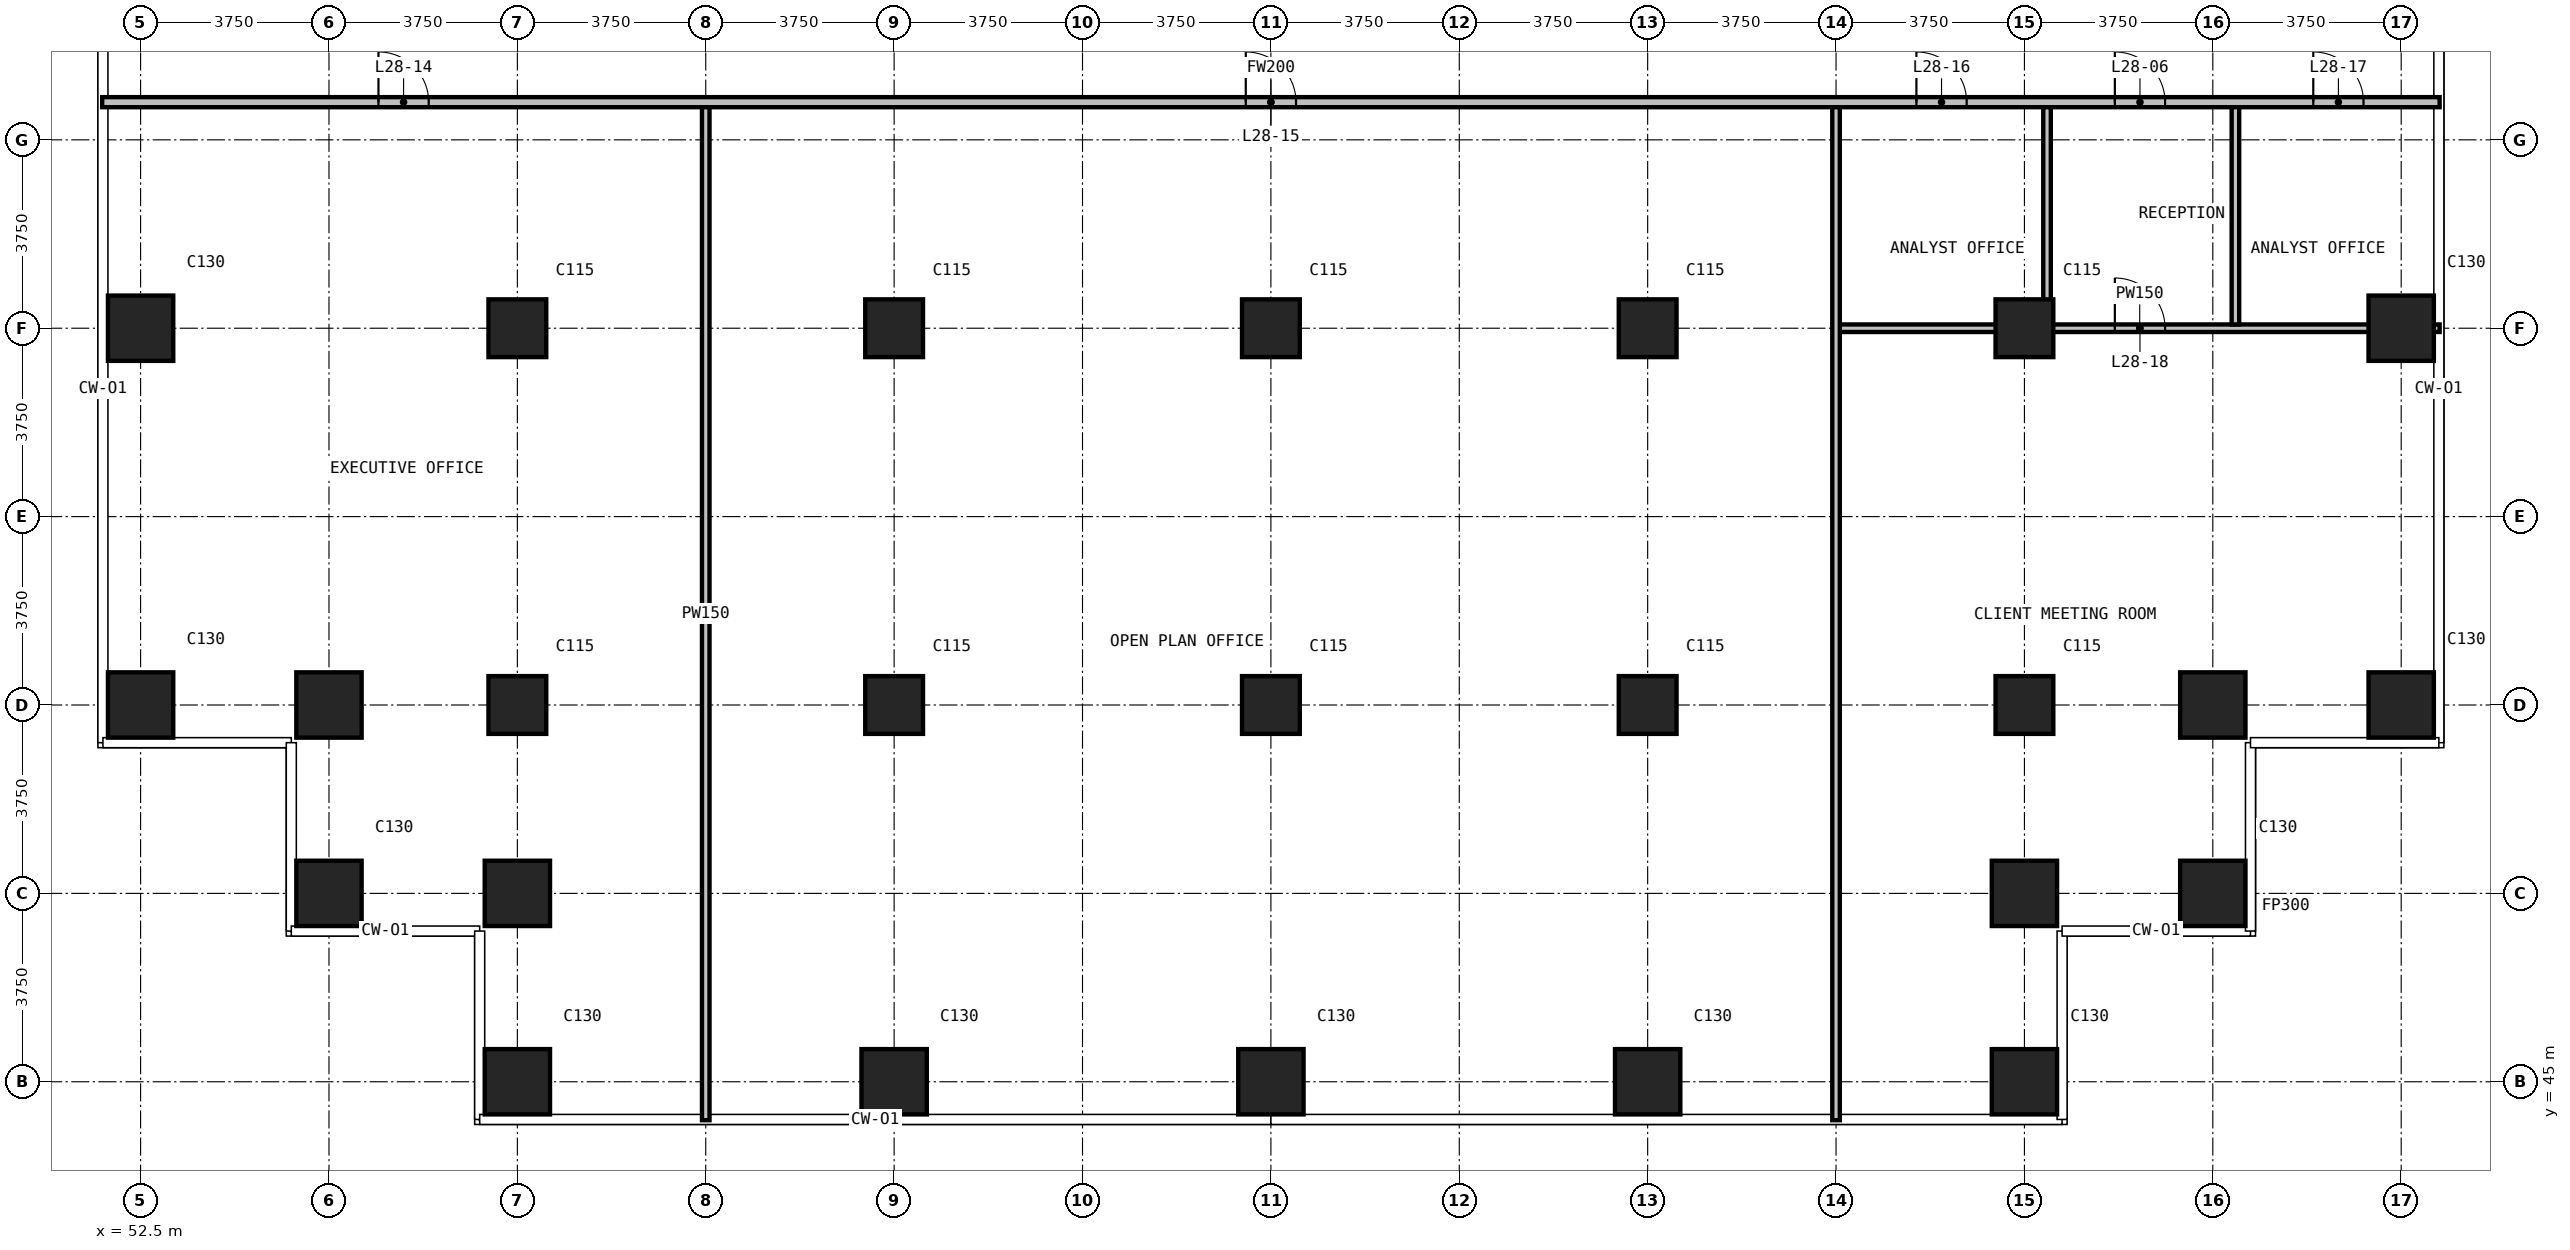
"""IFC4 building model, lengths in metres.
Left out: names, types, materials, properties, quantities, classifications, styles, units other than length and angle.
Written with IfcOpenShell. Run it as: python <this file> out.ifc"""

import sys

from ifc_helpers import new_model, si_unit, direction, frame, frame_2d, origin, origin_2d, place, context, subcontext, project, spatial, rectangle, extrude, element, fill, save


model = new_model("IFC4")
c1 = context("Model", 3, precision=1e-05, world=origin(), true_north=direction((0.0, 1.0)))
c2 = subcontext(c1, "Body", "Model", "MODEL_VIEW")
j1 = project(units=[si_unit("LENGTHUNIT", "METRE"), si_unit("PLANEANGLEUNIT", "RADIAN")], contexts=[c1])
p1 = place(None, origin())
s1 = spatial("IfcSite", under=j1, at=p1, CompositionType="ELEMENT")
p2 = place(p1, origin())
s2 = spatial("IfcBuilding", under=s1, at=p2, CompositionType="ELEMENT")
p3 = place(p2, frame((0.0, 0.0, 114.4)))
s3 = spatial("IfcBuildingStorey", under=s2, at=p3, CompositionType="ELEMENT", Elevation=114.4)
for number, where, z_axis, x_axis in (
    (1, (52.5, 52.5, 0.0), (0.0, 0.0, 1.0), (1.0, 0.0, 0.0)),
    (2, (52.5, 60.0, 0.0), (0.0, 0.0, 1.0), (1.0, 0.0, 0.0)),
    (3, (56.25, 48.75, 0.0), (0.0, 0.0, 1.0), (1.0, 0.0, 0.0)),
    (4, (56.25, 52.5, 0.0), (0.0, 0.0, 1.0), (1.0, 0.0, 0.0)),
    (5, (60.0, 45.0, 0.0), (0.0, 0.0, 1.0), (1.0, 0.0, 0.0)),
    (6, (60.0, 48.75, 0.0), (0.0, 0.0, 1.0), (1.0, 0.0, 0.0)),
):
    element("IfcColumn", number, at=place(p3, frame(where, z_axis=z_axis, x_axis=x_axis)), inside=s3, PredefinedType="COLUMN", context=c2, shape_type="SweptSolid", body=[
        extrude(rectangle(XDim=1.3, YDim=1.3, at=origin_2d()), origin(), (0.0, 0.0, 1.0), 3.6),
    ])
for number, where, z_axis, x_axis in (
    (7, (60.0, 52.5, 0.0), (0.0, 0.0, 1.0), (1.0, 0.0, 0.0)),
    (8, (60.0, 60.0, 0.0), (0.0, 0.0, 1.0), (1.0, 0.0, 0.0)),
):
    element("IfcColumn", number, at=place(p3, frame(where, z_axis=z_axis, x_axis=x_axis)), inside=s3, PredefinedType="COLUMN", context=c2, shape_type="SweptSolid", body=[
        extrude(rectangle(XDim=1.15, YDim=1.15, at=origin_2d()), origin(), (0.0, 0.0, 1.0), 3.6),
    ])
p4 = place(p3, frame((67.5, 45.0, 0.0), z_axis=(0.0, 0.0, 1.0), x_axis=(1.0, 0.0, 0.0)))
e9 = element("IfcColumn", 9, at=p4, inside=s3, PredefinedType="COLUMN", context=c2, shape_type="SweptSolid", body=[
    extrude(rectangle(XDim=1.3, YDim=1.3, at=origin_2d()), origin(), (0.0, 0.0, 1.0), 3.6),
])
for number, where, z_axis, x_axis in (
    (10, (67.5, 52.5, 0.0), (0.0, 0.0, 1.0), (1.0, 0.0, 0.0)),
    (11, (67.5, 60.0, 0.0), (0.0, 0.0, 1.0), (1.0, 0.0, 0.0)),
):
    element("IfcColumn", number, at=place(p3, frame(where, z_axis=z_axis, x_axis=x_axis)), inside=s3, PredefinedType="COLUMN", context=c2, shape_type="SweptSolid", body=[
        extrude(rectangle(XDim=1.15, YDim=1.15, at=origin_2d()), origin(), (0.0, 0.0, 1.0), 3.6),
    ])
p5 = place(p3, frame((75.0, 45.0, 0.0), z_axis=(0.0, 0.0, 1.0), x_axis=(1.0, 0.0, 0.0)))
e12 = element("IfcColumn", 12, at=p5, inside=s3, PredefinedType="COLUMN", context=c2, shape_type="SweptSolid", body=[
    extrude(rectangle(XDim=1.3, YDim=1.3, at=origin_2d()), origin(), (0.0, 0.0, 1.0), 3.6),
])
for number, where, z_axis, x_axis in (
    (13, (75.0, 52.5, 0.0), (0.0, 0.0, 1.0), (1.0, 0.0, 0.0)),
    (14, (75.0, 60.0, 0.0), (0.0, 0.0, 1.0), (1.0, 0.0, 0.0)),
):
    element("IfcColumn", number, at=place(p3, frame(where, z_axis=z_axis, x_axis=x_axis)), inside=s3, PredefinedType="COLUMN", context=c2, shape_type="SweptSolid", body=[
        extrude(rectangle(XDim=1.15, YDim=1.15, at=origin_2d()), origin(), (0.0, 0.0, 1.0), 3.6),
    ])
p6 = place(p3, frame((82.5, 45.0, 0.0), z_axis=(0.0, 0.0, 1.0), x_axis=(1.0, 0.0, 0.0)))
e15 = element("IfcColumn", 15, at=p6, inside=s3, PredefinedType="COLUMN", context=c2, shape_type="SweptSolid", body=[
    extrude(rectangle(XDim=1.3, YDim=1.3, at=origin_2d()), origin(), (0.0, 0.0, 1.0), 3.6),
])
for number, where, z_axis, x_axis in (
    (16, (82.5, 52.5, 0.0), (0.0, 0.0, 1.0), (1.0, 0.0, 0.0)),
    (17, (82.5, 60.0, 0.0), (0.0, 0.0, 1.0), (1.0, 0.0, 0.0)),
):
    element("IfcColumn", number, at=place(p3, frame(where, z_axis=z_axis, x_axis=x_axis)), inside=s3, PredefinedType="COLUMN", context=c2, shape_type="SweptSolid", body=[
        extrude(rectangle(XDim=1.15, YDim=1.15, at=origin_2d()), origin(), (0.0, 0.0, 1.0), 3.6),
    ])
for number, where, z_axis, x_axis in (
    (18, (90.0, 45.0, 0.0), (0.0, 0.0, 1.0), (1.0, 0.0, 0.0)),
    (19, (90.0, 48.75, 0.0), (0.0, 0.0, 1.0), (1.0, 0.0, 0.0)),
):
    element("IfcColumn", number, at=place(p3, frame(where, z_axis=z_axis, x_axis=x_axis)), inside=s3, PredefinedType="COLUMN", context=c2, shape_type="SweptSolid", body=[
        extrude(rectangle(XDim=1.3, YDim=1.3, at=origin_2d()), origin(), (0.0, 0.0, 1.0), 3.6),
    ])
for number, where, z_axis, x_axis in (
    (20, (90.0, 52.5, 0.0), (0.0, 0.0, 1.0), (1.0, 0.0, 0.0)),
    (21, (90.0, 60.0, 0.0), (0.0, 0.0, 1.0), (1.0, 0.0, 0.0)),
):
    element("IfcColumn", number, at=place(p3, frame(where, z_axis=z_axis, x_axis=x_axis)), inside=s3, PredefinedType="COLUMN", context=c2, shape_type="SweptSolid", body=[
        extrude(rectangle(XDim=1.15, YDim=1.15, at=origin_2d()), origin(), (0.0, 0.0, 1.0), 3.6),
    ])
for number, where, z_axis, x_axis in (
    (22, (93.75, 48.75, 0.0), (0.0, 0.0, 1.0), (1.0, 0.0, 0.0)),
    (23, (93.75, 52.5, 0.0), (0.0, 0.0, 1.0), (1.0, 0.0, 0.0)),
    (24, (97.5, 52.5, 0.0), (0.0, 0.0, 1.0), (1.0, 0.0, 0.0)),
    (25, (97.5, 60.0, 0.0), (0.0, 0.0, 1.0), (1.0, 0.0, 0.0)),
):
    element("IfcColumn", number, at=place(p3, frame(where, z_axis=z_axis, x_axis=x_axis)), inside=s3, PredefinedType="COLUMN", context=c2, shape_type="SweptSolid", body=[
        extrude(rectangle(XDim=1.3, YDim=1.3, at=origin_2d()), origin(), (0.0, 0.0, 1.0), 3.6),
    ])
p7 = place(p3, frame((51.735, 64.5, 0.0), z_axis=(0.0, 0.0, 1.0), x_axis=(1.0, 0.0, 0.0)))
e26 = element("IfcWall", 26, at=p7, inside=s3, PredefinedType="PARTITIONING", context=c2, shape_type="SweptSolid", body=[
    extrude(rectangle(XDim=46.53, YDim=0.2, at=frame_2d((23.265, 0.0))), origin(), (0.0, 0.0, 1.0), 3.3),
])
p8 = place(p7, frame((40.065, 0.0, 0.0)))
e27 = element("IfcOpeningElement", 27, at=p8, cuts=e26, PredefinedType="OPENING", context=c2, shape_type="SweptSolid", body=[
    extrude(rectangle(XDim=1.0, YDim=2.2, at=frame_2d((0.5, 1.1))), frame((0.0, 0.11, 0.0), z_axis=(0.0, -1.0, 0.0), x_axis=(1.0, 0.0, 0.0)), (0.0, 0.0, 1.0), 0.22),
])
p9 = place(p7, frame((5.5, 0.0, 0.0)))
e28 = element("IfcOpeningElement", 28, at=p9, cuts=e26, PredefinedType="OPENING", context=c2, shape_type="SweptSolid", body=[
    extrude(rectangle(XDim=1.0, YDim=2.2, at=frame_2d((0.5, 1.1))), frame((0.0, 0.11, 0.0), z_axis=(0.0, -1.0, 0.0), x_axis=(1.0, 0.0, 0.0)), (0.0, 0.0, 1.0), 0.22),
])
p10 = place(p7, frame((22.765, 0.0, 0.0)))
e29 = element("IfcOpeningElement", 29, at=p10, cuts=e26, PredefinedType="OPENING", context=c2, shape_type="SweptSolid", body=[
    extrude(rectangle(XDim=1.0, YDim=2.2, at=frame_2d((0.5, 1.1))), frame((0.0, 0.11, 0.0), z_axis=(0.0, -1.0, 0.0), x_axis=(1.0, 0.0, 0.0)), (0.0, 0.0, 1.0), 0.22),
])
p11 = place(p7, frame((36.115, 0.0, 0.0)))
e30 = element("IfcOpeningElement", 30, at=p11, cuts=e26, PredefinedType="OPENING", context=c2, shape_type="SweptSolid", body=[
    extrude(rectangle(XDim=1.0, YDim=2.2, at=frame_2d((0.5, 1.1))), frame((0.0, 0.11, 0.0), z_axis=(0.0, -1.0, 0.0), x_axis=(1.0, 0.0, 0.0)), (0.0, 0.0, 1.0), 0.22),
])
p12 = place(p7, frame((44.015, 0.0, 0.0)))
e31 = element("IfcOpeningElement", 31, at=p12, cuts=e26, PredefinedType="OPENING", context=c2, shape_type="SweptSolid", body=[
    extrude(rectangle(XDim=1.0, YDim=2.2, at=frame_2d((0.5, 1.1))), frame((0.0, 0.11, 0.0), z_axis=(0.0, -1.0, 0.0), x_axis=(1.0, 0.0, 0.0)), (0.0, 0.0, 1.0), 0.22),
])
p13 = place(p3, frame((86.325, 60.0, 0.0), z_axis=(0.0, 0.0, 1.0), x_axis=(1.0, 0.0, 0.0)))
e32 = element("IfcWall", 32, at=p13, inside=s3, PredefinedType="PARTITIONING", context=c2, shape_type="SweptSolid", body=[
    extrude(rectangle(XDim=11.94, YDim=0.15, at=frame_2d((5.97, 0.0))), origin(), (0.0, 0.0, 1.0), 3.3),
])
p14 = place(p13, frame((5.475, 0.0, 0.0)))
e33 = element("IfcOpeningElement", 33, at=p14, cuts=e32, PredefinedType="OPENING", context=c2, shape_type="SweptSolid", body=[
    extrude(rectangle(XDim=1.0, YDim=2.2, at=frame_2d((0.5, 1.1))), frame((0.0, 0.085, 0.0), z_axis=(0.0, -1.0, 0.0), x_axis=(1.0, 0.0, 0.0)), (0.0, 0.0, 1.0), 0.17),
])
for number, where, z_axis, x_axis in (
    (34, (63.75, 44.235, 0.0), (0.0, 0.0, 1.0), (0.0, 1.0, 0.0)),
    (35, (86.25, 44.235, 0.0), (0.0, 0.0, 1.0), (0.0, 1.0, 0.0)),
):
    element("IfcWall", number, at=place(p3, frame(where, z_axis=z_axis, x_axis=x_axis)), inside=s3, PredefinedType="PARTITIONING", context=c2, shape_type="SweptSolid", body=[
        extrude(rectangle(XDim=20.165, YDim=0.15, at=frame_2d((10.083, 0.0))), origin(), (0.0, 0.0, 1.0), 3.3),
    ])
for number, where, z_axis, x_axis in (
    (36, (90.45, 60.075, 0.0), (0.0, 0.0, 1.0), (0.0, 1.0, 0.0)),
    (37, (94.2, 60.075, 0.0), (0.0, 0.0, 1.0), (0.0, 1.0, 0.0)),
):
    element("IfcWall", number, at=place(p3, frame(where, z_axis=z_axis, x_axis=x_axis)), inside=s3, PredefinedType="PARTITIONING", context=c2, shape_type="SweptSolid", body=[
        extrude(rectangle(XDim=4.325, YDim=0.15, at=frame_2d((2.163, 0.0))), origin(), (0.0, 0.0, 1.0), 3.3),
    ])
p15 = place(p8, origin())
e38 = element("IfcDoor", 38, at=p15, inside=s3, OperationType="SINGLE_SWING_LEFT", PredefinedType="DOOR", context=c2, shape_type="SweptSolid", body=[
    extrude(rectangle(XDim=1.0, YDim=2.2, at=frame_2d((0.5, 1.1))), frame((0.0, 0.025, 0.0), z_axis=(0.0, -1.0, 0.0), x_axis=(1.0, 0.0, 0.0)), (0.0, 0.0, 1.0), 0.05),
])
fill(e27, e38)
p16 = place(p9, origin())
e39 = element("IfcDoor", 39, at=p16, inside=s3, OperationType="SINGLE_SWING_LEFT", PredefinedType="DOOR", context=c2, shape_type="SweptSolid", body=[
    extrude(rectangle(XDim=1.0, YDim=2.2, at=frame_2d((0.5, 1.1))), frame((0.0, 0.025, 0.0), z_axis=(0.0, -1.0, 0.0), x_axis=(1.0, 0.0, 0.0)), (0.0, 0.0, 1.0), 0.05),
])
fill(e28, e39)
p17 = place(p10, origin())
e40 = element("IfcDoor", 40, at=p17, inside=s3, OperationType="SINGLE_SWING_LEFT", PredefinedType="DOOR", context=c2, shape_type="SweptSolid", body=[
    extrude(rectangle(XDim=1.0, YDim=2.2, at=frame_2d((0.5, 1.1))), frame((0.0, 0.025, 0.0), z_axis=(0.0, -1.0, 0.0), x_axis=(1.0, 0.0, 0.0)), (0.0, 0.0, 1.0), 0.05),
])
fill(e29, e40)
p18 = place(p11, origin())
e41 = element("IfcDoor", 41, at=p18, inside=s3, OperationType="SINGLE_SWING_RIGHT", PredefinedType="DOOR", context=c2, shape_type="SweptSolid", body=[
    extrude(rectangle(XDim=1.0, YDim=2.2, at=frame_2d((0.5, 1.1))), frame((0.0, 0.025, 0.0), z_axis=(0.0, -1.0, 0.0), x_axis=(1.0, 0.0, 0.0)), (0.0, 0.0, 1.0), 0.05),
])
fill(e30, e41)
p19 = place(p12, origin())
e42 = element("IfcDoor", 42, at=p19, inside=s3, OperationType="SINGLE_SWING_RIGHT", PredefinedType="DOOR", context=c2, shape_type="SweptSolid", body=[
    extrude(rectangle(XDim=1.0, YDim=2.2, at=frame_2d((0.5, 1.1))), frame((0.0, 0.025, 0.0), z_axis=(0.0, -1.0, 0.0), x_axis=(1.0, 0.0, 0.0)), (0.0, 0.0, 1.0), 0.05),
])
fill(e31, e42)
p20 = place(p14, origin())
e43 = element("IfcDoor", 43, at=p20, inside=s3, OperationType="SINGLE_SWING_RIGHT", PredefinedType="DOOR", context=c2, shape_type="SweptSolid", body=[
    extrude(rectangle(XDim=1.0, YDim=2.2, at=frame_2d((0.5, 1.1))), frame((0.0, 0.025, 0.0), z_axis=(0.0, -1.0, 0.0), x_axis=(1.0, 0.0, 0.0)), (0.0, 0.0, 1.0), 0.05),
])
fill(e33, e43)
save(model, sys.argv[1])
